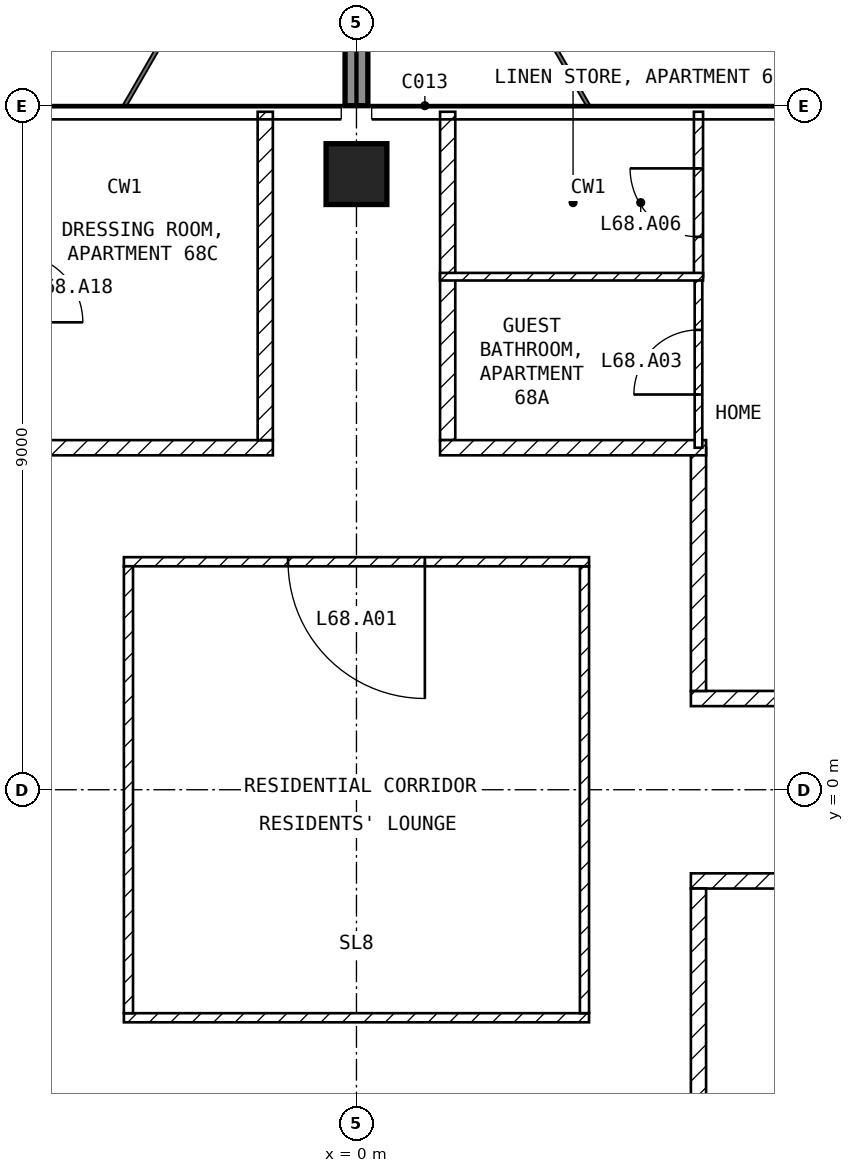
"""IFC4 building model, lengths in metres.
Left out: names, types, materials, properties, quantities, classifications, styles, units other than length and angle.
Written with IfcOpenShell. Run it as: python <this file> out.ifc"""

import sys

from ifc_helpers import new_model, si_unit, direction, frame, frame_2d, origin, origin_2d, place, context, subcontext, project, spatial, rectangle, extrude, element, fill, save


model = new_model("IFC4")
c1 = context("Model", 3, precision=1e-05, world=origin(), true_north=direction((0.0, 1.0)))
c2 = subcontext(c1, "Body", "Model", "MODEL_VIEW")
j1 = project(units=[si_unit("LENGTHUNIT", "METRE"), si_unit("PLANEANGLEUNIT", "RADIAN")], contexts=[c1])
p1 = place(None, origin())
s1 = spatial("IfcSite", under=j1, at=p1, CompositionType="ELEMENT")
p2 = place(p1, origin())
s2 = spatial("IfcBuilding", under=s1, at=p2, CompositionType="ELEMENT")
p3 = place(p2, frame((0.0, 0.0, 267.5)))
s3 = spatial("IfcBuildingStorey", under=s2, at=p3, CompositionType="ELEMENT", Elevation=267.5)
p4 = place(p3, frame((0.0, 8.1, -0.25), z_axis=(0.0, 0.0, 1.0), x_axis=(1.0, 0.0, 0.0)))
e1 = element("IfcColumn", 1, at=p4, inside=s3, PredefinedType="COLUMN", context=c2, shape_type="SweptSolid", body=[
    extrude(rectangle(XDim=0.8, YDim=0.8, at=origin_2d()), origin(), (0.0, 0.0, 1.0), 3.5),
])
p5 = place(p3, frame((0.0, 9.0, 0.0), z_axis=(0.0, 0.0, 1.0), x_axis=(0.0, 1.0, 0.0)))
e2 = element("IfcWall", 2, at=p5, inside=s3, PredefinedType="SOLIDWALL", context=c2, shape_type="SweptSolid", body=[
    extrude(rectangle(XDim=2.7, YDim=0.3, at=frame_2d((1.35, 0.0))), origin(), (0.0, 0.0, 1.0), 3.25),
])
p6 = place(p3, frame((-3.06, -3.0, 0.0), z_axis=(0.0, 0.0, 1.0), x_axis=(1.0, 0.0, 0.0)))
e3 = element("IfcWall", 3, at=p6, inside=s3, PredefinedType="PARTITIONING", context=c2, shape_type="SweptSolid", body=[
    extrude(rectangle(XDim=6.12, YDim=0.12, at=frame_2d((3.06, 0.0))), origin(), (0.0, 0.0, 1.0), 3.25),
])
p7 = place(p3, frame((3.0, -2.94, 0.0), z_axis=(0.0, 0.0, 1.0), x_axis=(0.0, 1.0, 0.0)))
e4 = element("IfcWall", 4, at=p7, inside=s3, PredefinedType="PARTITIONING", context=c2, shape_type="SweptSolid", body=[
    extrude(rectangle(XDim=5.88, YDim=0.12, at=frame_2d((2.94, 0.0))), origin(), (0.0, 0.0, 1.0), 3.25),
])
p8 = place(p3, frame((3.06, 3.0, 0.0), z_axis=(0.0, 0.0, 1.0), x_axis=(-1.0, 0.0, 0.0)))
e5 = element("IfcWall", 5, at=p8, inside=s3, PredefinedType="PARTITIONING", context=c2, shape_type="SweptSolid", body=[
    extrude(rectangle(XDim=6.12, YDim=0.12, at=frame_2d((3.06, 0.0))), origin(), (0.0, 0.0, 1.0), 3.25),
])
p9 = place(p8, frame((2.16, 0.0, 0.0)))
e6 = element("IfcOpeningElement", 6, at=p9, cuts=e5, PredefinedType="OPENING", context=c2, shape_type="SweptSolid", body=[
    extrude(rectangle(XDim=1.8, YDim=2.1, at=frame_2d((0.9, 1.05))), frame((0.0, 0.07, 0.0), z_axis=(0.0, -1.0, 0.0), x_axis=(1.0, 0.0, 0.0)), (0.0, 0.0, 1.0), 0.14),
])
p10 = place(p3, frame((-3.0, 2.94, 0.0), z_axis=(0.0, 0.0, 1.0), x_axis=(0.0, -1.0, 0.0)))
e7 = element("IfcWall", 7, at=p10, inside=s3, PredefinedType="PARTITIONING", context=c2, shape_type="SweptSolid", body=[
    extrude(rectangle(XDim=5.88, YDim=0.12, at=frame_2d((2.94, 0.0))), origin(), (0.0, 0.0, 1.0), 3.25),
])
p11 = place(p3, frame((4.4, 1.2, 0.0), z_axis=(0.0, 0.0, 1.0), x_axis=(1.0, 0.0, 0.0)))
e8 = element("IfcWall", 8, at=p11, inside=s3, PredefinedType="PARTITIONING", context=c2, shape_type="SweptSolid", body=[
    extrude(rectangle(XDim=17.2, YDim=0.2, at=frame_2d((8.6, 0.0))), origin(), (0.0, 0.0, 1.0), 3.25),
])
p12 = place(p11, frame((13.175, 0.0, 0.0)))
e9 = element("IfcOpeningElement", 9, at=p12, cuts=e8, PredefinedType="OPENING", context=c2, shape_type="SweptSolid", body=[
    extrude(rectangle(XDim=1.0, YDim=2.1, at=frame_2d((0.5, 1.05))), frame((0.0, 0.11, 0.0), z_axis=(0.0, -1.0, 0.0), x_axis=(1.0, 0.0, 0.0)), (0.0, 0.0, 1.0), 0.22),
])
p13 = place(p3, frame((4.5, 4.5, 0.0), z_axis=(0.0, 0.0, 1.0), x_axis=(0.0, -1.0, 0.0)))
e10 = element("IfcWall", 10, at=p13, inside=s3, PredefinedType="PARTITIONING", context=c2, shape_type="SweptSolid", body=[
    extrude(rectangle(XDim=3.2, YDim=0.2, at=frame_2d((1.6, 0.0))), origin(), (0.0, 0.0, 1.0), 3.25),
])
p14 = place(p3, frame((1.2, 8.92, 0.0), z_axis=(0.0, 0.0, 1.0), x_axis=(0.0, -1.0, 0.0)))
e11 = element("IfcWall", 11, at=p14, inside=s3, PredefinedType="PARTITIONING", context=c2, shape_type="SweptSolid", body=[
    extrude(rectangle(XDim=4.32, YDim=0.2, at=frame_2d((2.16, 0.0))), origin(), (0.0, 0.0, 1.0), 3.25),
])
p15 = place(p3, frame((1.1, 4.5, 0.0), z_axis=(0.0, 0.0, 1.0), x_axis=(1.0, 0.0, 0.0)))
e12 = element("IfcWall", 12, at=p15, inside=s3, PredefinedType="PARTITIONING", context=c2, shape_type="SweptSolid", body=[
    extrude(rectangle(XDim=3.5, YDim=0.2, at=frame_2d((1.75, 0.0))), origin(), (0.0, 0.0, 1.0), 3.25),
])
p16 = place(p3, frame((21.6, -1.2, 0.0), z_axis=(0.0, 0.0, 1.0), x_axis=(-1.0, 0.0, 0.0)))
e13 = element("IfcWall", 13, at=p16, inside=s3, PredefinedType="PARTITIONING", context=c2, shape_type="SweptSolid", body=[
    extrude(rectangle(XDim=17.2, YDim=0.2, at=frame_2d((8.6, 0.0))), origin(), (0.0, 0.0, 1.0), 3.25),
])
p17 = place(p16, frame((10.45, 0.0, 0.0)))
e14 = element("IfcOpeningElement", 14, at=p17, cuts=e13, PredefinedType="OPENING", context=c2, shape_type="SweptSolid", body=[
    extrude(rectangle(XDim=1.0, YDim=2.1, at=frame_2d((0.5, 1.05))), frame((0.0, 0.11, 0.0), z_axis=(0.0, -1.0, 0.0), x_axis=(1.0, 0.0, 0.0)), (0.0, 0.0, 1.0), 0.22),
])
p18 = place(p3, frame((4.5, -1.3, 0.0), z_axis=(0.0, 0.0, 1.0), x_axis=(0.0, -1.0, 0.0)))
e15 = element("IfcWall", 15, at=p18, inside=s3, PredefinedType="PARTITIONING", context=c2, shape_type="SweptSolid", body=[
    extrude(rectangle(XDim=3.2, YDim=0.2, at=frame_2d((1.6, 0.0))), origin(), (0.0, 0.0, 1.0), 3.25),
])
p19 = place(p3, frame((-4.6, 4.5, 0.0), z_axis=(0.0, 0.0, 1.0), x_axis=(1.0, 0.0, 0.0)))
e16 = element("IfcWall", 16, at=p19, inside=s3, PredefinedType="PARTITIONING", context=c2, shape_type="SweptSolid", body=[
    extrude(rectangle(XDim=3.5, YDim=0.2, at=frame_2d((1.75, 0.0))), origin(), (0.0, 0.0, 1.0), 3.25),
])
p20 = place(p3, frame((-1.2, 4.6, 0.0), z_axis=(0.0, 0.0, 1.0), x_axis=(0.0, 1.0, 0.0)))
e17 = element("IfcWall", 17, at=p20, inside=s3, PredefinedType="PARTITIONING", context=c2, shape_type="SweptSolid", body=[
    extrude(rectangle(XDim=4.32, YDim=0.2, at=frame_2d((2.16, 0.0))), origin(), (0.0, 0.0, 1.0), 3.25),
])
p21 = place(p3, frame((4.5, 4.5, 0.0), z_axis=(0.0, 0.0, 1.0), x_axis=(0.0, 1.0, 0.0)))
e18 = element("IfcWall", 18, at=p21, inside=s3, PredefinedType="PARTITIONING", context=c2, shape_type="SweptSolid", body=[
    extrude(rectangle(XDim=2.25, YDim=0.1, at=frame_2d((1.125, 0.0))), origin(), (0.0, 0.0, 1.0), 3.25),
])
p22 = place(p21, frame((0.7, 0.0, 0.0)))
e19 = element("IfcOpeningElement", 19, at=p22, cuts=e18, PredefinedType="OPENING", context=c2, shape_type="SweptSolid", body=[
    extrude(rectangle(XDim=0.85, YDim=2.1, at=frame_2d((0.425, 1.05))), frame((0.0, 0.06, 0.0), z_axis=(0.0, -1.0, 0.0), x_axis=(1.0, 0.0, 0.0)), (0.0, 0.0, 1.0), 0.12),
])
p23 = place(p3, frame((4.5, 6.75, 0.0), z_axis=(0.0, 0.0, 1.0), x_axis=(0.0, 1.0, 0.0)))
e20 = element("IfcWall", 20, at=p23, inside=s3, PredefinedType="PARTITIONING", context=c2, shape_type="SweptSolid", body=[
    extrude(rectangle(XDim=2.17, YDim=0.12, at=frame_2d((1.085, 0.0))), origin(), (0.0, 0.0, 1.0), 3.25),
])
p24 = place(p23, frame((0.525, 0.0, 0.0)))
e21 = element("IfcOpeningElement", 21, at=p24, cuts=e20, PredefinedType="OPENING", context=c2, shape_type="SweptSolid", body=[
    extrude(rectangle(XDim=0.9, YDim=2.1, at=frame_2d((0.45, 1.05))), frame((0.0, 0.07, 0.0), z_axis=(0.0, -1.0, 0.0), x_axis=(1.0, 0.0, 0.0)), (0.0, 0.0, 1.0), 0.14),
])
p25 = place(p3, frame((1.1, 6.75, 0.0), z_axis=(0.0, 0.0, 1.0), x_axis=(1.0, 0.0, 0.0)))
e22 = element("IfcWall", 22, at=p25, inside=s3, PredefinedType="PARTITIONING", context=c2, shape_type="SweptSolid", body=[
    extrude(rectangle(XDim=3.46, YDim=0.1, at=frame_2d((1.73, 0.0))), origin(), (0.0, 0.0, 1.0), 3.25),
])
p26 = place(p9, origin())
e23 = element("IfcDoor", 23, at=p26, inside=s3, OperationType="SINGLE_SWING_LEFT", PredefinedType="DOOR", context=c2, shape_type="SweptSolid", body=[
    extrude(rectangle(XDim=1.8, YDim=2.1, at=frame_2d((0.9, 1.05))), frame((0.0, 0.025, 0.0), z_axis=(0.0, -1.0, 0.0), x_axis=(1.0, 0.0, 0.0)), (0.0, 0.0, 1.0), 0.05),
])
fill(e6, e23)
p27 = place(p22, origin())
e24 = element("IfcDoor", 24, at=p27, inside=s3, OperationType="SINGLE_SWING_LEFT", PredefinedType="DOOR", context=c2, shape_type="SweptSolid", body=[
    extrude(rectangle(XDim=0.85, YDim=2.1, at=frame_2d((0.425, 1.05))), frame((0.0, 0.025, 0.0), z_axis=(0.0, -1.0, 0.0), x_axis=(1.0, 0.0, 0.0)), (0.0, 0.0, 1.0), 0.05),
])
fill(e19, e24)
p28 = place(p24, origin())
e25 = element("IfcDoor", 25, at=p28, inside=s3, OperationType="SINGLE_SWING_RIGHT", PredefinedType="DOOR", context=c2, shape_type="SweptSolid", body=[
    extrude(rectangle(XDim=0.9, YDim=2.1, at=frame_2d((0.45, 1.05))), frame((0.0, 0.025, 0.0), z_axis=(0.0, -1.0, 0.0), x_axis=(1.0, 0.0, 0.0)), (0.0, 0.0, 1.0), 0.05),
])
fill(e21, e25)
save(model, sys.argv[1])
